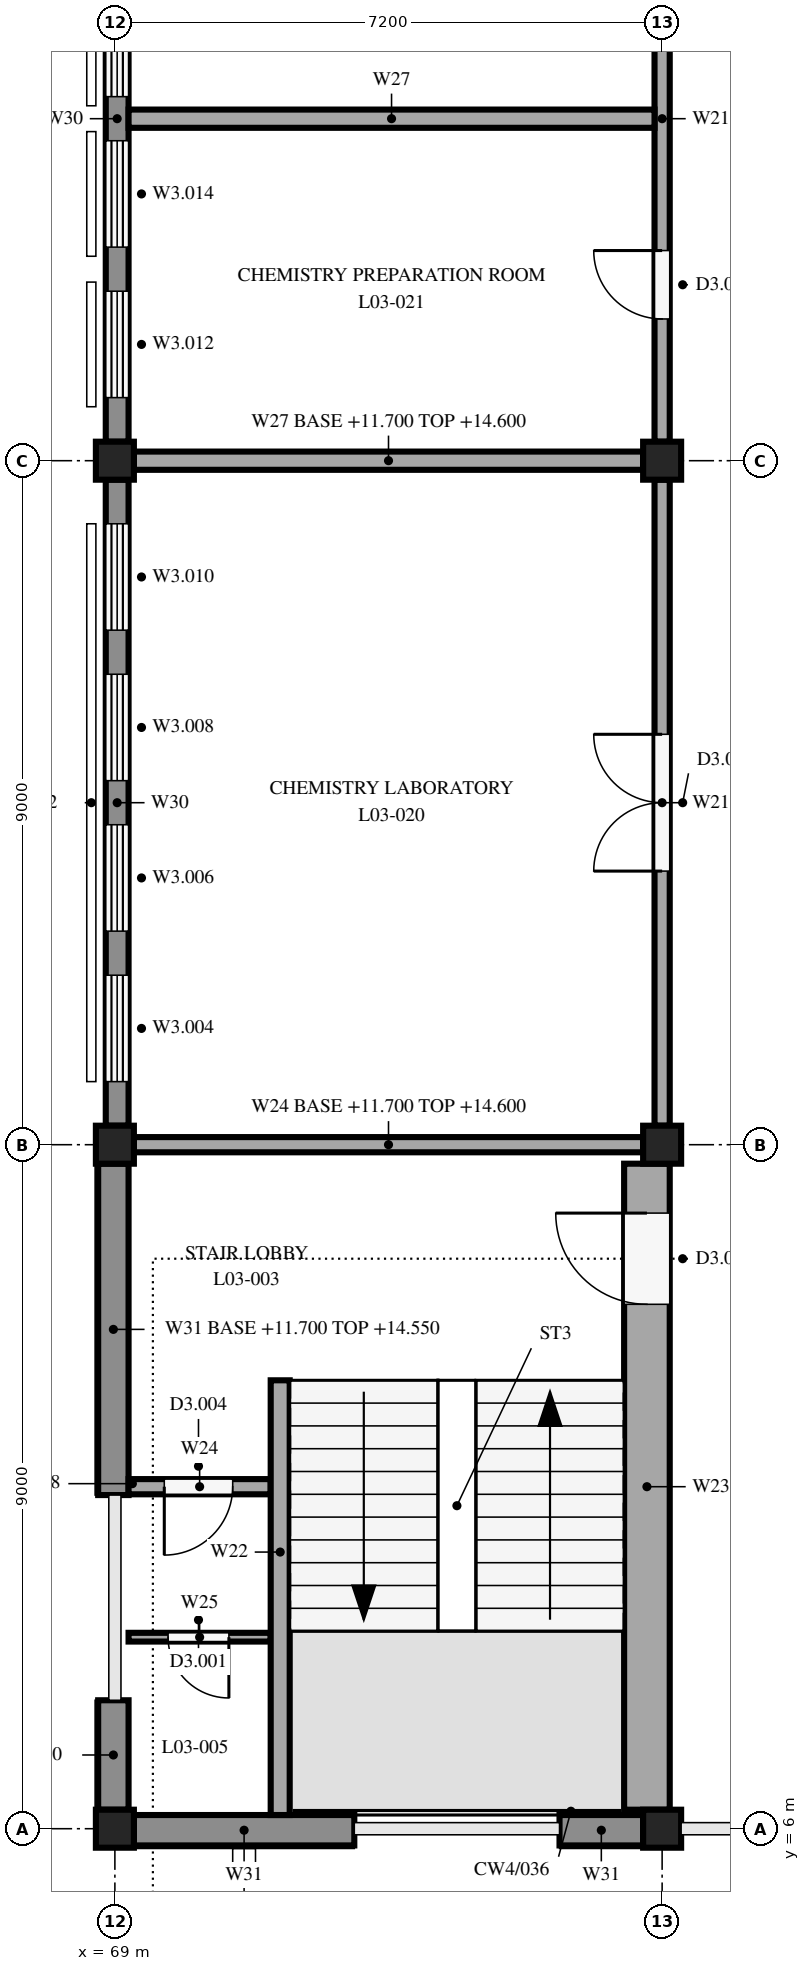
"""IFC4 building model, lengths in metres.
Left out: names, types, materials, properties, quantities, classifications, styles, units other than length and angle.
Written with IfcOpenShell. Run it as: python <this file> out.ifc"""

import sys

from ifc_helpers import new_model, si_unit, direction, frame, frame_2d, origin, origin_2d, place, context, subcontext, project, spatial, rectangle, extrude, element, fill, save


model = new_model("IFC4")
c1 = context("Model", 3, precision=1e-05, world=origin(), true_north=direction((0.0, 1.0)))
c2 = subcontext(c1, "Body", "Model", "MODEL_VIEW")
j1 = project(units=[si_unit("LENGTHUNIT", "METRE"), si_unit("PLANEANGLEUNIT", "RADIAN")], contexts=[c1])
p1 = place(None, origin())
s1 = spatial("IfcSite", under=j1, at=p1, CompositionType="ELEMENT")
p2 = place(p1, origin())
s2 = spatial("IfcBuilding", under=s1, at=p2, CompositionType="ELEMENT")
p3 = place(p2, frame((0.0, 0.0, 11.7)))
s3 = spatial("IfcBuildingStorey", under=s2, at=p3, CompositionType="ELEMENT", Elevation=11.7)
for number, where, z_axis, x_axis in (
    (1, (69.0, 6.0, 0.0), (0.0, 0.0, 1.0), (1.0, 0.0, 0.0)),
    (2, (69.0, 15.0, 0.0), (0.0, 0.0, 1.0), (1.0, 0.0, 0.0)),
    (3, (69.0, 24.0, 0.0), (0.0, 0.0, 1.0), (1.0, 0.0, 0.0)),
    (4, (76.2, 6.0, 0.0), (0.0, 0.0, 1.0), (1.0, 0.0, 0.0)),
    (5, (76.2, 15.0, 0.0), (0.0, 0.0, 1.0), (1.0, 0.0, 0.0)),
    (6, (76.2, 24.0, 0.0), (0.0, 0.0, 1.0), (1.0, 0.0, 0.0)),
):
    element("IfcColumn", number, at=place(p3, frame(where, z_axis=z_axis, x_axis=x_axis)), inside=s3, PredefinedType="COLUMN", context=c2, shape_type="SweptSolid", body=[
        extrude(rectangle(XDim=0.5, YDim=0.5, at=origin_2d()), origin(), (0.0, 0.0, 1.0), 3.35),
    ])
p4 = place(p3, frame((68.98, 6.25, 0.0), z_axis=(0.0, 0.0, 1.0), x_axis=(0.0, 1.0, 0.0)))
e7 = element("IfcWall", 7, at=p4, inside=s3, PredefinedType="STANDARD", context=c2, shape_type="SweptSolid", body=[
    extrude(rectangle(XDim=1.44, YDim=0.4, at=frame_2d((0.72, 0.0))), origin(), (0.0, 0.0, 1.0), 2.85),
])
p5 = place(p3, frame((68.98, 10.39, 0.0), z_axis=(0.0, 0.0, 1.0), x_axis=(0.0, 1.0, 0.0)))
e8 = element("IfcWall", 8, at=p5, inside=s3, PredefinedType="STANDARD", context=c2, shape_type="SweptSolid", body=[
    extrude(rectangle(XDim=4.36, YDim=0.4, at=frame_2d((2.18, 0.0))), origin(), (0.0, 0.0, 1.0), 2.85),
])
p6 = place(p3, frame((69.03, 15.25, 0.0), z_axis=(0.0, 0.0, 1.0), x_axis=(0.0, 1.0, 0.0)))
e9 = element("IfcWall", 9, at=p6, inside=s3, PredefinedType="STANDARD", context=c2, shape_type="SweptSolid", body=[
    extrude(rectangle(XDim=8.5, YDim=0.3, at=frame_2d((4.25, 0.0))), origin(), (0.0, 0.0, 1.0), 2.85),
])
p7 = place(p6, frame((0.58, 0.0, 0.9)))
e10 = element("IfcOpeningElement", 10, at=p7, cuts=e9, PredefinedType="OPENING", context=c2, shape_type="SweptSolid", body=[
    extrude(rectangle(XDim=1.4, YDim=1.9, at=frame_2d((0.7, 0.95))), frame((0.0, 0.16, 0.0), z_axis=(0.0, -1.0, 0.0), x_axis=(1.0, 0.0, 0.0)), (0.0, 0.0, 1.0), 0.32),
])
p8 = place(p6, frame((2.56, 0.0, 0.9)))
e11 = element("IfcOpeningElement", 11, at=p8, cuts=e9, PredefinedType="OPENING", context=c2, shape_type="SweptSolid", body=[
    extrude(rectangle(XDim=1.4, YDim=1.9, at=frame_2d((0.7, 0.95))), frame((0.0, 0.16, 0.0), z_axis=(0.0, -1.0, 0.0), x_axis=(1.0, 0.0, 0.0)), (0.0, 0.0, 1.0), 0.32),
])
p9 = place(p6, frame((4.54, 0.0, 0.9)))
e12 = element("IfcOpeningElement", 12, at=p9, cuts=e9, PredefinedType="OPENING", context=c2, shape_type="SweptSolid", body=[
    extrude(rectangle(XDim=1.4, YDim=1.9, at=frame_2d((0.7, 0.95))), frame((0.0, 0.16, 0.0), z_axis=(0.0, -1.0, 0.0), x_axis=(1.0, 0.0, 0.0)), (0.0, 0.0, 1.0), 0.32),
])
p10 = place(p6, frame((6.52, 0.0, 0.9)))
e13 = element("IfcOpeningElement", 13, at=p10, cuts=e9, PredefinedType="OPENING", context=c2, shape_type="SweptSolid", body=[
    extrude(rectangle(XDim=1.4, YDim=1.9, at=frame_2d((0.7, 0.95))), frame((0.0, 0.16, 0.0), z_axis=(0.0, -1.0, 0.0), x_axis=(1.0, 0.0, 0.0)), (0.0, 0.0, 1.0), 0.32),
])
p11 = place(p3, frame((69.03, 24.25, 0.0), z_axis=(0.0, 0.0, 1.0), x_axis=(0.0, 1.0, 0.0)))
e14 = element("IfcWall", 14, at=p11, inside=s3, PredefinedType="STANDARD", context=c2, shape_type="SweptSolid", body=[
    extrude(rectangle(XDim=8.5, YDim=0.3, at=frame_2d((4.25, 0.0))), origin(), (0.0, 0.0, 1.0), 2.85),
])
p12 = place(p11, frame((0.58, 0.0, 0.9)))
e15 = element("IfcOpeningElement", 15, at=p12, cuts=e14, PredefinedType="OPENING", context=c2, shape_type="SweptSolid", body=[
    extrude(rectangle(XDim=1.4, YDim=1.9, at=frame_2d((0.7, 0.95))), frame((0.0, 0.16, 0.0), z_axis=(0.0, -1.0, 0.0), x_axis=(1.0, 0.0, 0.0)), (0.0, 0.0, 1.0), 0.32),
])
p13 = place(p11, frame((2.56, 0.0, 0.9)))
e16 = element("IfcOpeningElement", 16, at=p13, cuts=e14, PredefinedType="OPENING", context=c2, shape_type="SweptSolid", body=[
    extrude(rectangle(XDim=1.4, YDim=1.9, at=frame_2d((0.7, 0.95))), frame((0.0, 0.16, 0.0), z_axis=(0.0, -1.0, 0.0), x_axis=(1.0, 0.0, 0.0)), (0.0, 0.0, 1.0), 0.32),
])
p14 = place(p11, frame((4.54, 0.0, 0.9)))
e17 = element("IfcOpeningElement", 17, at=p14, cuts=e14, PredefinedType="OPENING", context=c2, shape_type="SweptSolid", body=[
    extrude(rectangle(XDim=1.4, YDim=1.9, at=frame_2d((0.7, 0.95))), frame((0.0, 0.16, 0.0), z_axis=(0.0, -1.0, 0.0), x_axis=(1.0, 0.0, 0.0)), (0.0, 0.0, 1.0), 0.32),
])
p15 = place(p11, frame((6.52, 0.0, 0.9)))
e18 = element("IfcOpeningElement", 18, at=p15, cuts=e14, PredefinedType="OPENING", context=c2, shape_type="SweptSolid", body=[
    extrude(rectangle(XDim=1.4, YDim=1.9, at=frame_2d((0.7, 0.95))), frame((0.0, 0.16, 0.0), z_axis=(0.0, -1.0, 0.0), x_axis=(1.0, 0.0, 0.0)), (0.0, 0.0, 1.0), 0.32),
])
p16 = place(p3, frame((72.15, 5.98, 0.0), z_axis=(0.0, 0.0, 1.0), x_axis=(-1.0, 0.0, 0.0)))
e19 = element("IfcWall", 19, at=p16, inside=s3, PredefinedType="STANDARD", context=c2, shape_type="SweptSolid", body=[
    extrude(rectangle(XDim=2.9, YDim=0.4, at=frame_2d((1.45, 0.0))), origin(), (0.0, 0.0, 1.0), 2.9),
])
p17 = place(p3, frame((75.95, 5.98, 0.0), z_axis=(0.0, 0.0, 1.0), x_axis=(-1.0, 0.0, 0.0)))
e20 = element("IfcWall", 20, at=p17, inside=s3, PredefinedType="STANDARD", context=c2, shape_type="SweptSolid", body=[
    extrude(rectangle(XDim=1.1, YDim=0.4, at=frame_2d((0.55, 0.0))), origin(), (0.0, 0.0, 1.0), 2.9),
])
p18 = place(p3, frame((71.175, 6.18, 0.0), z_axis=(0.0, 0.0, 1.0), x_axis=(0.0, 1.0, 0.0)))
e21 = element("IfcWall", 21, at=p18, inside=s3, PredefinedType="SOLIDWALL", context=c2, shape_type="SweptSolid", body=[
    extrude(rectangle(XDim=5.72, YDim=0.25, at=frame_2d((2.86, 0.0))), origin(), (0.0, 0.0, 1.0), 3.35),
])
p19 = place(p3, frame((76.0, 6.25, 0.0), z_axis=(0.0, 0.0, 1.0), x_axis=(0.0, 1.0, 0.0)))
e22 = element("IfcWall", 22, at=p19, inside=s3, PredefinedType="SOLIDWALL", context=c2, shape_type="SweptSolid", body=[
    extrude(rectangle(XDim=8.5, YDim=0.6, at=frame_2d((4.25, 0.0))), origin(), (0.0, 0.0, 1.0), 3.35),
])
p20 = place(p19, frame((6.65, 0.0, 0.0)))
e23 = element("IfcOpeningElement", 23, at=p20, cuts=e22, PredefinedType="OPENING", context=c2, shape_type="SweptSolid", body=[
    extrude(rectangle(XDim=1.2, YDim=2.1, at=frame_2d((0.6, 1.05))), frame((0.0, 0.31, 0.0), z_axis=(0.0, -1.0, 0.0), x_axis=(1.0, 0.0, 0.0)), (0.0, 0.0, 1.0), 0.62),
])
p21 = place(p3, frame((71.05, 10.5, 0.0), z_axis=(0.0, 0.0, 1.0), x_axis=(-1.0, 0.0, 0.0)))
e24 = element("IfcWall", 24, at=p21, inside=s3, PredefinedType="SOLIDWALL", context=c2, shape_type="SweptSolid", body=[
    extrude(rectangle(XDim=1.87, YDim=0.2, at=frame_2d((0.935, 0.0))), origin(), (0.0, 0.0, 1.0), 3.35),
])
p22 = place(p21, frame((0.5, 0.0, 0.0)))
e25 = element("IfcOpeningElement", 25, at=p22, cuts=e24, PredefinedType="OPENING", context=c2, shape_type="SweptSolid", body=[
    extrude(rectangle(XDim=0.9, YDim=2.1, at=frame_2d((0.45, 1.05))), frame((0.0, 0.11, 0.0), z_axis=(0.0, -1.0, 0.0), x_axis=(1.0, 0.0, 0.0)), (0.0, 0.0, 1.0), 0.22),
])
p23 = place(p3, frame((71.05, 8.52, 0.0), z_axis=(0.0, 0.0, 1.0), x_axis=(-1.0, 0.0, 0.0)))
e26 = element("IfcWall", 26, at=p23, inside=s3, PredefinedType="PARTITIONING", context=c2, shape_type="SweptSolid", body=[
    extrude(rectangle(XDim=1.87, YDim=0.115, at=frame_2d((0.935, 0.0))), origin(), (0.0, 0.0, 1.0), 3.35),
])
p24 = place(p23, frame((0.55, 0.0, 0.0)))
e27 = element("IfcOpeningElement", 27, at=p24, cuts=e26, PredefinedType="OPENING", context=c2, shape_type="SweptSolid", body=[
    extrude(rectangle(XDim=0.8, YDim=2.1, at=frame_2d((0.4, 1.05))), frame((0.0, 0.067, 0.0), z_axis=(0.0, -1.0, 0.0), x_axis=(1.0, 0.0, 0.0)), (0.0, 0.0, 1.0), 0.135),
])
p25 = place(p3, frame((69.25, 15.0, 0.0), z_axis=(0.0, 0.0, 1.0), x_axis=(1.0, 0.0, 0.0)))
e28 = element("IfcWall", 28, at=p25, inside=s3, PredefinedType="SOLIDWALL", context=c2, shape_type="SweptSolid", body=[
    extrude(rectangle(XDim=6.7, YDim=0.2, at=frame_2d((3.35, 0.0))), origin(), (0.0, 0.0, 1.0), 2.9),
])
p26 = place(p3, frame((76.2, 15.25, 0.0), z_axis=(0.0, 0.0, 1.0), x_axis=(0.0, 1.0, 0.0)))
e29 = element("IfcWall", 29, at=p26, inside=s3, PredefinedType="PARTITIONING", context=c2, shape_type="SweptSolid", body=[
    extrude(rectangle(XDim=8.5, YDim=0.2, at=frame_2d((4.25, 0.0))), origin(), (0.0, 0.0, 1.0), 2.9),
])
p27 = place(p26, frame((3.35, 0.0, 0.0)))
e30 = element("IfcOpeningElement", 30, at=p27, cuts=e29, PredefinedType="OPENING", context=c2, shape_type="SweptSolid", body=[
    extrude(rectangle(XDim=1.8, YDim=2.1, at=frame_2d((0.9, 1.05))), frame((0.0, 0.11, 0.0), z_axis=(0.0, -1.0, 0.0), x_axis=(1.0, 0.0, 0.0)), (0.0, 0.0, 1.0), 0.22),
])
p28 = place(p3, frame((76.2, 24.25, 0.0), z_axis=(0.0, 0.0, 1.0), x_axis=(0.0, 1.0, 0.0)))
e31 = element("IfcWall", 31, at=p28, inside=s3, PredefinedType="PARTITIONING", context=c2, shape_type="SweptSolid", body=[
    extrude(rectangle(XDim=8.5, YDim=0.2, at=frame_2d((4.25, 0.0))), origin(), (0.0, 0.0, 1.0), 2.9),
])
p29 = place(p28, frame((1.615, 0.0, 0.0)))
e32 = element("IfcOpeningElement", 32, at=p29, cuts=e31, PredefinedType="OPENING", context=c2, shape_type="SweptSolid", body=[
    extrude(rectangle(XDim=0.9, YDim=2.1, at=frame_2d((0.45, 1.05))), frame((0.0, 0.11, 0.0), z_axis=(0.0, -1.0, 0.0), x_axis=(1.0, 0.0, 0.0)), (0.0, 0.0, 1.0), 0.22),
])
p30 = place(p3, frame((69.25, 24.0, 0.0), z_axis=(0.0, 0.0, 1.0), x_axis=(1.0, 0.0, 0.0)))
e33 = element("IfcWall", 33, at=p30, inside=s3, PredefinedType="PARTITIONING", context=c2, shape_type="SweptSolid", body=[
    extrude(rectangle(XDim=6.7, YDim=0.24, at=frame_2d((3.35, 0.0))), origin(), (0.0, 0.0, 1.0), 2.9),
])
p31 = place(p3, frame((69.18, 28.5, 0.0), z_axis=(0.0, 0.0, 1.0), x_axis=(1.0, 0.0, 0.0)))
e34 = element("IfcWall", 34, at=p31, inside=s3, PredefinedType="PARTITIONING", context=c2, shape_type="SweptSolid", body=[
    extrude(rectangle(XDim=6.92, YDim=0.24, at=frame_2d((3.46, 0.0))), origin(), (0.0, 0.0, 1.0), 3.35),
])
p32 = place(p7, origin())
e35 = element("IfcWindow", 35, at=p32, inside=s3, PartitioningType="DOUBLE_PANEL_VERTICAL", PredefinedType="WINDOW", context=c2, shape_type="SweptSolid", body=[
    extrude(rectangle(XDim=1.4, YDim=1.9, at=frame_2d((0.7, 0.95))), frame((0.0, 0.03, 0.0), z_axis=(0.0, -1.0, 0.0), x_axis=(1.0, 0.0, 0.0)), (0.0, 0.0, 1.0), 0.06),
])
fill(e10, e35)
p33 = place(p8, origin())
e36 = element("IfcWindow", 36, at=p33, inside=s3, PartitioningType="DOUBLE_PANEL_VERTICAL", PredefinedType="WINDOW", context=c2, shape_type="SweptSolid", body=[
    extrude(rectangle(XDim=1.4, YDim=1.9, at=frame_2d((0.7, 0.95))), frame((0.0, 0.03, 0.0), z_axis=(0.0, -1.0, 0.0), x_axis=(1.0, 0.0, 0.0)), (0.0, 0.0, 1.0), 0.06),
])
fill(e11, e36)
p34 = place(p9, origin())
e37 = element("IfcWindow", 37, at=p34, inside=s3, PartitioningType="DOUBLE_PANEL_VERTICAL", PredefinedType="WINDOW", context=c2, shape_type="SweptSolid", body=[
    extrude(rectangle(XDim=1.4, YDim=1.9, at=frame_2d((0.7, 0.95))), frame((0.0, 0.03, 0.0), z_axis=(0.0, -1.0, 0.0), x_axis=(1.0, 0.0, 0.0)), (0.0, 0.0, 1.0), 0.06),
])
fill(e12, e37)
p35 = place(p10, origin())
e38 = element("IfcWindow", 38, at=p35, inside=s3, PartitioningType="DOUBLE_PANEL_VERTICAL", PredefinedType="WINDOW", context=c2, shape_type="SweptSolid", body=[
    extrude(rectangle(XDim=1.4, YDim=1.9, at=frame_2d((0.7, 0.95))), frame((0.0, 0.03, 0.0), z_axis=(0.0, -1.0, 0.0), x_axis=(1.0, 0.0, 0.0)), (0.0, 0.0, 1.0), 0.06),
])
fill(e13, e38)
p36 = place(p12, origin())
e39 = element("IfcWindow", 39, at=p36, inside=s3, PartitioningType="DOUBLE_PANEL_VERTICAL", PredefinedType="WINDOW", context=c2, shape_type="SweptSolid", body=[
    extrude(rectangle(XDim=1.4, YDim=1.9, at=frame_2d((0.7, 0.95))), frame((0.0, 0.03, 0.0), z_axis=(0.0, -1.0, 0.0), x_axis=(1.0, 0.0, 0.0)), (0.0, 0.0, 1.0), 0.06),
])
fill(e15, e39)
p37 = place(p13, origin())
e40 = element("IfcWindow", 40, at=p37, inside=s3, PartitioningType="DOUBLE_PANEL_VERTICAL", PredefinedType="WINDOW", context=c2, shape_type="SweptSolid", body=[
    extrude(rectangle(XDim=1.4, YDim=1.9, at=frame_2d((0.7, 0.95))), frame((0.0, 0.03, 0.0), z_axis=(0.0, -1.0, 0.0), x_axis=(1.0, 0.0, 0.0)), (0.0, 0.0, 1.0), 0.06),
])
fill(e16, e40)
p38 = place(p14, origin())
e41 = element("IfcWindow", 41, at=p38, inside=s3, PartitioningType="DOUBLE_PANEL_VERTICAL", PredefinedType="WINDOW", context=c2, shape_type="SweptSolid", body=[
    extrude(rectangle(XDim=1.4, YDim=1.9, at=frame_2d((0.7, 0.95))), frame((0.0, 0.03, 0.0), z_axis=(0.0, -1.0, 0.0), x_axis=(1.0, 0.0, 0.0)), (0.0, 0.0, 1.0), 0.06),
])
fill(e17, e41)
p39 = place(p20, origin())
e42 = element("IfcDoor", 42, at=p39, inside=s3, OperationType="SINGLE_SWING_RIGHT", PredefinedType="DOOR", context=c2, shape_type="SweptSolid", body=[
    extrude(rectangle(XDim=1.2, YDim=2.1, at=frame_2d((0.6, 1.05))), frame((0.0, 0.025, 0.0), z_axis=(0.0, -1.0, 0.0), x_axis=(1.0, 0.0, 0.0)), (0.0, 0.0, 1.0), 0.05),
])
fill(e23, e42)
p40 = place(p22, origin())
e43 = element("IfcDoor", 43, at=p40, inside=s3, OperationType="SINGLE_SWING_RIGHT", PredefinedType="DOOR", context=c2, shape_type="SweptSolid", body=[
    extrude(rectangle(XDim=0.9, YDim=2.1, at=frame_2d((0.45, 1.05))), frame((0.0, 0.025, 0.0), z_axis=(0.0, -1.0, 0.0), x_axis=(1.0, 0.0, 0.0)), (0.0, 0.0, 1.0), 0.05),
])
fill(e25, e43)
p41 = place(p24, origin())
e44 = element("IfcDoor", 44, at=p41, inside=s3, OperationType="SINGLE_SWING_LEFT", PredefinedType="DOOR", context=c2, shape_type="SweptSolid", body=[
    extrude(rectangle(XDim=0.8, YDim=2.1, at=frame_2d((0.4, 1.05))), frame((0.0, 0.025, 0.0), z_axis=(0.0, -1.0, 0.0), x_axis=(1.0, 0.0, 0.0)), (0.0, 0.0, 1.0), 0.05),
])
fill(e27, e44)
p42 = place(p27, origin())
e45 = element("IfcDoor", 45, at=p42, inside=s3, OperationType="DOUBLE_DOOR_DOUBLE_SWING", PredefinedType="DOOR", context=c2, shape_type="SweptSolid", body=[
    extrude(rectangle(XDim=1.8, YDim=2.1, at=frame_2d((0.9, 1.05))), frame((0.0, 0.025, 0.0), z_axis=(0.0, -1.0, 0.0), x_axis=(1.0, 0.0, 0.0)), (0.0, 0.0, 1.0), 0.05),
])
fill(e30, e45)
p43 = place(p29, origin())
e46 = element("IfcDoor", 46, at=p43, inside=s3, OperationType="SINGLE_SWING_RIGHT", PredefinedType="DOOR", context=c2, shape_type="SweptSolid", body=[
    extrude(rectangle(XDim=0.9, YDim=2.1, at=frame_2d((0.45, 1.05))), frame((0.0, 0.025, 0.0), z_axis=(0.0, -1.0, 0.0), x_axis=(1.0, 0.0, 0.0)), (0.0, 0.0, 1.0), 0.05),
])
fill(e32, e46)
save(model, sys.argv[1])
